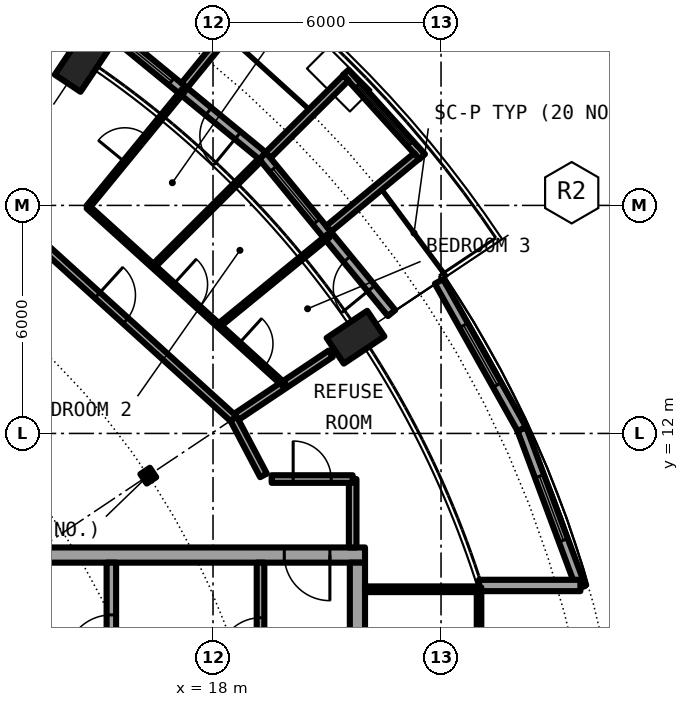
"""IFC4 building model, lengths in metres.
Left out: names, types, materials, properties, quantities, classifications, styles, units other than length and angle.
Written with IfcOpenShell. Run it as: python <this file> out.ifc"""

import sys

from ifc_helpers import new_model, si_unit, direction, frame, frame_2d, origin, origin_2d, place, context, subcontext, project, spatial, rectangle, circle, hollow_circle, i_section, extrude, element, fill, save


model = new_model("IFC4")
c1 = context("Model", 3, precision=1e-05, world=origin(), true_north=direction((0.0, 1.0)))
c2 = subcontext(c1, "Body", "Model", "MODEL_VIEW")
j1 = project(units=[si_unit("LENGTHUNIT", "METRE"), si_unit("PLANEANGLEUNIT", "RADIAN")], contexts=[c1])
p1 = place(None, origin())
s1 = spatial("IfcSite", under=j1, at=p1, CompositionType="ELEMENT")
p2 = place(p1, origin())
s2 = spatial("IfcBuilding", under=s1, at=p2, CompositionType="ELEMENT")
p3 = place(p2, frame((0.0, 0.0, 234.05)))
s3 = spatial("IfcBuildingStorey", under=s2, at=p3, CompositionType="ELEMENT", Elevation=234.05)
for number, where, z_axis, x_axis in (
    (1, (22.283, 14.889, 0.0), (-0.347, -0.232, 0.909), (0.556, -0.831, 0.0)),
    (2, (14.889, 22.283, 0.0), (-0.232, -0.347, 0.909), (0.831, -0.556, 0.0)),
):
    element("IfcColumn", number, at=place(p3, frame(where, z_axis=z_axis, x_axis=x_axis)), inside=s3, PredefinedType="COLUMN", context=c2, shape_type="SweptSolid", body=[
        extrude(hollow_circle(Radius=0.406, WallThickness=0.03, at=origin_2d()), origin(), (0.0, 0.0, 1.0), 3.081),
    ])
p4 = place(p3, frame((16.297, 10.889, 0.0), z_axis=(0.0, 0.0, 1.0), x_axis=(0.831469612303, 0.55557023302, 0.0)))
e3 = element("IfcColumn", 3, at=p4, inside=s3, PredefinedType="COLUMN", context=c2, shape_type="SweptSolid", body=[
    extrude(i_section(OverallWidth=0.3, OverallDepth=0.3, WebThickness=0.011, FlangeThickness=0.019, FilletRadius=0.027, at=origin_2d()), origin(), (0.0, 0.0, 1.0), 3.05),
])
p5 = place(p3, frame((22.699, 15.167, 0.0), z_axis=(0.0, 0.0, 1.0), x_axis=(-0.634382322723, 0.773019449054, 0.0)))
e4 = element("IfcWall", 4, at=p5, inside=s3, PredefinedType="SOLIDWALL", context=c2, shape_type="SweptSolid", body=[
    extrude(rectangle(XDim=5.352, YDim=0.25, at=frame_2d((2.676, 0.0))), origin(), (0.0, 0.0, 1.0), 2.7),
])
p6 = place(p5, frame((0.841, 0.0, 0.0)))
e5 = element("IfcOpeningElement", 5, at=p6, cuts=e4, PredefinedType="OPENING", context=c2, shape_type="SweptSolid", body=[
    extrude(rectangle(XDim=1.0, YDim=2.2, at=frame_2d((0.5, 1.1))), frame((0.0, 0.135, 0.0), z_axis=(0.0, -1.0, 0.0), x_axis=(1.0, 0.0, 0.0)), (0.0, 0.0, 1.0), 0.27),
])
p7 = place(p5, frame((3.111, 0.0, 0.3)))
e6 = element("IfcOpeningElement", 6, at=p7, cuts=e4, PredefinedType="OPENING", context=c2, shape_type="SweptSolid", body=[
    extrude(rectangle(XDim=1.8, YDim=2.1, at=frame_2d((0.9, 1.05))), frame((0.0, 0.135, 0.0), z_axis=(0.0, -1.0, 0.0), x_axis=(1.0, 0.0, 0.0)), (0.0, 0.0, 1.0), 0.27),
])
p8 = place(p3, frame((23.503, 19.282, -0.03), z_axis=(0.0, 0.0, 1.0), x_axis=(-0.671506829416, 0.740998365753, 0.0)))
e7 = element("IfcWall", 7, at=p8, inside=s3, PredefinedType="SOLIDWALL", context=c2, shape_type="SweptSolid", body=[
    extrude(rectangle(XDim=2.993, YDim=0.2, at=frame_2d((1.497, 0.0))), origin(), (0.0, 0.0, 1.0), 2.73),
])
p9 = place(p8, frame((0.457, 0.0, 0.33)))
e8 = element("IfcOpeningElement", 8, at=p9, cuts=e7, PredefinedType="OPENING", context=c2, shape_type="SweptSolid", body=[
    extrude(circle(Radius=1.04, at=frame_2d((1.04, 1.04))), frame((0.0, 0.11, 0.0), z_axis=(0.0, -1.0, 0.0), x_axis=(1.0, 0.0, 0.0)), (0.0, 0.0, 1.0), 0.22),
])
p10 = place(p3, frame((21.041, 17.384, -0.03), z_axis=(0.0, 0.0, 1.0), x_axis=(0.770784861449, 0.63709551667, 0.0)))
e9 = element("IfcWall", 9, at=p10, inside=s3, PredefinedType="SOLIDWALL", context=c2, shape_type="SweptSolid", body=[
    extrude(rectangle(XDim=3.006, YDim=0.2, at=frame_2d((1.503, 0.0))), origin(), (0.0, 0.0, 1.0), 2.73),
])
p11 = place(p3, frame((19.45, 19.323, -0.03), z_axis=(0.0, 0.0, 1.0), x_axis=(0.709727076896, 0.704476739375, 0.0)))
e10 = element("IfcWall", 10, at=p11, inside=s3, PredefinedType="SOLIDWALL", context=c2, shape_type="SweptSolid", body=[
    extrude(rectangle(XDim=2.883, YDim=0.2, at=frame_2d((1.441, 0.0))), origin(), (0.0, 0.0, 1.0), 2.73),
])
p12 = place(p3, frame((19.304, 19.304, 0.0), z_axis=(0.0, 0.0, 1.0), x_axis=(-0.773019449054, 0.634382322723, 0.0)))
e11 = element("IfcWall", 11, at=p12, inside=s3, PredefinedType="SOLIDWALL", context=c2, shape_type="SweptSolid", body=[
    extrude(rectangle(XDim=5.352, YDim=0.25, at=frame_2d((2.676, 0.0))), origin(), (0.0, 0.0, 1.0), 2.7),
])
p13 = place(p12, frame((0.841, 0.0, 0.0)))
e12 = element("IfcOpeningElement", 12, at=p13, cuts=e11, PredefinedType="OPENING", context=c2, shape_type="SweptSolid", body=[
    extrude(rectangle(XDim=1.0, YDim=2.2, at=frame_2d((0.5, 1.1))), frame((0.0, 0.135, 0.0), z_axis=(0.0, -1.0, 0.0), x_axis=(1.0, 0.0, 0.0)), (0.0, 0.0, 1.0), 0.27),
])
p14 = place(p12, frame((3.096, 0.0, 0.3)))
e13 = element("IfcOpeningElement", 13, at=p14, cuts=e11, PredefinedType="OPENING", context=c2, shape_type="SweptSolid", body=[
    extrude(rectangle(XDim=1.8, YDim=2.1, at=frame_2d((0.9, 1.05))), frame((0.0, 0.135, 0.0), z_axis=(0.0, -1.0, 0.0), x_axis=(1.0, 0.0, 0.0)), (0.0, 0.0, 1.0), 0.27),
])
p15 = place(p3, frame((17.246, 21.155, -0.03), z_axis=(0.0, 0.0, 1.0), x_axis=(0.631546363729, 0.775338113639, 0.0)))
e14 = element("IfcWall", 14, at=p15, inside=s3, PredefinedType="SOLIDWALL", context=c2, shape_type="SweptSolid", body=[
    extrude(rectangle(XDim=3.005, YDim=0.2, at=frame_2d((1.502, 0.0))), origin(), (0.0, 0.0, 1.0), 2.73),
])
p16 = place(p3, frame((27.682, 7.945, 0.0), z_axis=(0.0, 0.0, 1.0), x_axis=(-0.349247811493, 0.937030397675, 0.0)))
e15 = element("IfcWall", 15, at=p16, inside=s3, PredefinedType="SOLIDWALL", context=c2, shape_type="SweptSolid", body=[
    extrude(rectangle(XDim=4.452, YDim=0.25, at=frame_2d((2.226, 0.0))), origin(), (0.0, 0.0, 1.0), 2.7),
])
p17 = place(p16, frame((1.327, 0.0, 0.3)))
e16 = element("IfcOpeningElement", 16, at=p17, cuts=e15, PredefinedType="OPENING", context=c2, shape_type="SweptSolid", body=[
    extrude(rectangle(XDim=1.8, YDim=2.1, at=frame_2d((0.9, 1.05))), frame((0.0, 0.135, 0.0), z_axis=(0.0, -1.0, 0.0), x_axis=(1.0, 0.0, 0.0)), (0.0, 0.0, 1.0), 0.27),
])
p18 = place(p3, frame((26.127, 12.117, 0.0), z_axis=(0.0, 0.0, 1.0), x_axis=(-0.489696356642, 0.871893042919, 0.0)))
e17 = element("IfcWall", 17, at=p18, inside=s3, PredefinedType="SOLIDWALL", context=c2, shape_type="SweptSolid", body=[
    extrude(rectangle(XDim=4.454, YDim=0.25, at=frame_2d((2.227, 0.0))), origin(), (0.0, 0.0, 1.0), 2.7),
])
p19 = place(p18, frame((1.327, 0.0, 0.3)))
e18 = element("IfcOpeningElement", 18, at=p19, cuts=e17, PredefinedType="OPENING", context=c2, shape_type="SweptSolid", body=[
    extrude(rectangle(XDim=1.8, YDim=2.1, at=frame_2d((0.9, 1.05))), frame((0.0, 0.135, 0.0), z_axis=(0.0, -1.0, 0.0), x_axis=(1.0, 0.0, 0.0)), (0.0, 0.0, 1.0), 0.27),
])
p20 = place(p3, frame((25.0, 8.0, 0.0), z_axis=(0.0, 0.0, 1.0), x_axis=(1.0, 0.0, 0.0)))
e19 = element("IfcWall", 19, at=p20, inside=s3, PredefinedType="SOLIDWALL", context=c2, shape_type="SweptSolid", body=[
    extrude(rectangle(XDim=2.667, YDim=0.3, at=frame_2d((1.333, 0.0))), origin(), (0.0, 0.0, 1.0), 2.7),
])
p21 = place(p3, frame((22.0, 8.8, 0.0), z_axis=(0.0, 0.0, 1.0), x_axis=(-1.0, 0.0, 0.0)))
e20 = element("IfcWall", 20, at=p21, inside=s3, PredefinedType="SHEAR", context=c2, shape_type="SweptSolid", body=[
    extrude(rectangle(XDim=13.4, YDim=0.4, at=frame_2d((6.7, 0.0))), origin(), (0.0, 0.0, 1.0), 3.05),
])
p22 = place(p21, frame((0.925, 0.0, 0.0)))
e21 = element("IfcOpeningElement", 21, at=p22, cuts=e20, PredefinedType="OPENING", context=c2, shape_type="SweptSolid", body=[
    extrude(rectangle(XDim=1.2, YDim=2.3, at=frame_2d((0.6, 1.15))), frame((0.0, 0.21, 0.0), z_axis=(0.0, -1.0, 0.0), x_axis=(1.0, 0.0, 0.0)), (0.0, 0.0, 1.0), 0.42),
])
p23 = place(p3, frame((21.8, 8.6, 0.0), z_axis=(0.0, 0.0, 1.0), x_axis=(0.0, -1.0, 0.0)))
e22 = element("IfcWall", 22, at=p23, inside=s3, PredefinedType="SHEAR", context=c2, shape_type="SweptSolid", body=[
    extrude(rectangle(XDim=17.2, YDim=0.4, at=frame_2d((8.6, 0.0))), origin(), (0.0, 0.0, 1.0), 3.05),
])
p24 = place(p23, frame((7.7, 0.0, 0.0)))
e23 = element("IfcOpeningElement", 23, at=p24, cuts=e22, PredefinedType="OPENING", context=c2, shape_type="SweptSolid", body=[
    extrude(rectangle(XDim=1.8, YDim=2.3, at=frame_2d((0.9, 1.15))), frame((0.0, 0.21, 0.0), z_axis=(0.0, -1.0, 0.0), x_axis=(1.0, 0.0, 0.0)), (0.0, 0.0, 1.0), 0.42),
])
p25 = place(p3, frame((15.325, 4.65, 0.0), z_axis=(0.0, 0.0, 1.0), x_axis=(0.0, 1.0, 0.0)))
e24 = element("IfcWall", 24, at=p25, inside=s3, PredefinedType="SHEAR", context=c2, shape_type="SweptSolid", body=[
    extrude(rectangle(XDim=3.95, YDim=0.25, at=frame_2d((1.975, 0.0))), origin(), (0.0, 0.0, 1.0), 3.05),
])
p26 = place(p25, frame((1.375, 0.0, 0.0)))
e25 = element("IfcOpeningElement", 25, at=p26, cuts=e24, PredefinedType="OPENING", context=c2, shape_type="SweptSolid", body=[
    extrude(rectangle(XDim=1.2, YDim=2.3, at=frame_2d((0.6, 1.15))), frame((0.0, 0.135, 0.0), z_axis=(0.0, -1.0, 0.0), x_axis=(1.0, 0.0, 0.0)), (0.0, 0.0, 1.0), 0.27),
])
p27 = place(p3, frame((19.25, 1.575, 0.0), z_axis=(0.0, 0.0, 1.0), x_axis=(0.0, 1.0, 0.0)))
e26 = element("IfcWall", 26, at=p27, inside=s3, PredefinedType="SOLIDWALL", context=c2, shape_type="SweptSolid", body=[
    extrude(rectangle(XDim=7.025, YDim=0.2, at=frame_2d((3.513, 0.0))), origin(), (0.0, 0.0, 1.0), 2.7),
])
p28 = place(p27, frame((4.475, 0.0, 0.0)))
e27 = element("IfcOpeningElement", 27, at=p28, cuts=e26, PredefinedType="OPENING", context=c2, shape_type="SweptSolid", body=[
    extrude(rectangle(XDim=1.1, YDim=2.3, at=frame_2d((0.55, 1.15))), frame((0.0, 0.11, 0.0), z_axis=(0.0, -1.0, 0.0), x_axis=(1.0, 0.0, 0.0)), (0.0, 0.0, 1.0), 0.22),
])
p29 = place(p3, frame((22.0, 7.9, 0.0), z_axis=(0.0, 0.0, 1.0), x_axis=(1.0, 0.0, 0.0)))
e28 = element("IfcWall", 28, at=p29, inside=s3, PredefinedType="PARTITIONING", context=c2, shape_type="SweptSolid", body=[
    extrude(rectangle(XDim=2.94, YDim=0.15, at=frame_2d((1.47, 0.0))), origin(), (0.0, 0.0, 1.0), 2.7),
])
p30 = place(p3, frame((25.0, -7.95, 0.0), z_axis=(0.0, 0.0, 1.0), x_axis=(0.0, 1.0, 0.0)))
e29 = element("IfcWall", 29, at=p30, inside=s3, PredefinedType="PARTITIONING", context=c2, shape_type="SweptSolid", body=[
    extrude(rectangle(XDim=15.9, YDim=0.12, at=frame_2d((7.95, 0.0))), origin(), (0.0, 0.0, 1.0), 2.7),
])
p31 = place(p30, frame((0.95, 0.0, 0.1)))
e30 = element("IfcOpeningElement", 30, at=p31, cuts=e29, PredefinedType="OPENING", context=c2, shape_type="SweptSolid", body=[
    extrude(rectangle(XDim=14.0, YDim=2.35, at=frame_2d((7.0, 1.175))), frame((0.0, 0.07, 0.0), z_axis=(0.0, -1.0, 0.0), x_axis=(1.0, 0.0, 0.0)), (0.0, 0.0, 1.0), 0.14),
])
p32 = place(p3, frame((21.675, 9.0, 0.0), z_axis=(0.0, 0.0, 1.0), x_axis=(0.0, 1.0, 0.0)))
e31 = element("IfcWall", 31, at=p32, inside=s3, PredefinedType="PARTITIONING", context=c2, shape_type="SweptSolid", body=[
    extrude(rectangle(XDim=1.8, YDim=0.2, at=frame_2d((0.9, 0.0))), origin(), (0.0, 0.0, 1.0), 2.7),
])
p33 = place(p3, frame((14.709, 17.958, 0.0), z_axis=(0.0, 0.0, 1.0), x_axis=(0.633590098448, 0.773668913133, 0.0)))
e32 = element("IfcWall", 32, at=p33, inside=s3, PredefinedType="PARTITIONING", context=c2, shape_type="SweptSolid", body=[
    extrude(rectangle(XDim=3.962, YDim=0.1, at=frame_2d((1.981, 0.0))), origin(), (0.0, 0.0, 1.0), 2.7),
])
p34 = place(p33, frame((1.531, 0.0, 0.0)))
e33 = element("IfcOpeningElement", 33, at=p34, cuts=e32, PredefinedType="OPENING", context=c2, shape_type="SweptSolid", body=[
    extrude(rectangle(XDim=0.9, YDim=2.3, at=frame_2d((0.45, 1.15))), frame((0.0, 0.06, 0.0), z_axis=(0.0, -1.0, 0.0), x_axis=(1.0, 0.0, 0.0)), (0.0, 0.0, 1.0), 0.12),
])
p35 = place(p3, frame((16.43, 16.398, 0.0), z_axis=(0.0, 0.0, 1.0), x_axis=(0.707722727509, 0.706490297858, 0.0)))
e34 = element("IfcWall", 34, at=p35, inside=s3, PredefinedType="PARTITIONING", context=c2, shape_type="SweptSolid", body=[
    extrude(rectangle(XDim=3.962, YDim=0.1, at=frame_2d((1.981, 0.0))), origin(), (0.0, 0.0, 1.0), 2.7),
])
p36 = place(p3, frame((18.151, 14.838, 0.0), z_axis=(0.0, 0.0, 1.0), x_axis=(0.774321581607, 0.63279229472, 0.0)))
e35 = element("IfcWall", 35, at=p36, inside=s3, PredefinedType="PARTITIONING", context=c2, shape_type="SweptSolid", body=[
    extrude(rectangle(XDim=3.731, YDim=0.1, at=frame_2d((1.866, 0.0))), origin(), (0.0, 0.0, 1.0), 2.7),
])
p37 = place(p3, frame((18.542, 12.389, 0.0), z_axis=(0.0, 0.0, 1.0), x_axis=(0.831340764735, 0.555763018642, 0.0)))
e36 = element("IfcWall", 36, at=p37, inside=s3, PredefinedType="PARTITIONING", context=c2, shape_type="SweptSolid", body=[
    extrude(rectangle(XDim=3.073, YDim=0.2, at=frame_2d((1.537, 0.0))), origin(), (0.0, 0.0, 1.0), 2.7),
])
p38 = place(p3, frame((19.543, 10.8, 0.0), z_axis=(0.0, 0.0, 1.0), x_axis=(1.0, 0.0, 0.0)))
e37 = element("IfcWall", 37, at=p38, inside=s3, PredefinedType="PARTITIONING", context=c2, shape_type="SweptSolid", body=[
    extrude(rectangle(XDim=2.132, YDim=0.2, at=frame_2d((1.066, 0.0))), origin(), (0.0, 0.0, 1.0), 2.7),
])
p39 = place(p38, frame((0.566, 0.0, 0.0)))
e38 = element("IfcOpeningElement", 38, at=p39, cuts=e37, PredefinedType="OPENING", context=c2, shape_type="SweptSolid", body=[
    extrude(rectangle(XDim=1.0, YDim=2.3, at=frame_2d((0.5, 1.15))), frame((0.0, 0.11, 0.0), z_axis=(0.0, -1.0, 0.0), x_axis=(1.0, 0.0, 0.0)), (0.0, 0.0, 1.0), 0.22),
])
p40 = place(p3, frame((10.512, 19.667, 0.0), z_axis=(0.0, 0.0, 1.0), x_axis=(0.740849323054, -0.67167125927, 0.0)))
e39 = element("IfcWall", 39, at=p40, inside=s3, PredefinedType="PARTITIONING", context=c2, shape_type="SweptSolid", body=[
    extrude(rectangle(XDim=10.842, YDim=0.2, at=frame_2d((5.421, 0.0))), origin(), (0.0, 0.0, 1.0), 2.7),
])
p41 = place(p40, frame((6.003, 0.0, 0.0)))
e40 = element("IfcOpeningElement", 40, at=p41, cuts=e39, PredefinedType="OPENING", context=c2, shape_type="SweptSolid", body=[
    extrude(rectangle(XDim=1.0, YDim=2.3, at=frame_2d((0.5, 1.15))), frame((0.0, 0.11, 0.0), z_axis=(0.0, -1.0, 0.0), x_axis=(1.0, 0.0, 0.0)), (0.0, 0.0, 1.0), 0.22),
])
p42 = place(p3, frame((18.542, 12.389, 0.0), z_axis=(0.0, 0.0, 1.0), x_axis=(0.465812036273, -0.88488369115, 0.0)))
e41 = element("IfcWall", 41, at=p42, inside=s3, PredefinedType="PARTITIONING", context=c2, shape_type="SweptSolid", body=[
    extrude(rectangle(XDim=1.687, YDim=0.2, at=frame_2d((0.844, 0.0))), origin(), (0.0, 0.0, 1.0), 2.7),
])
p43 = place(p3, frame((14.709, 17.958, 0.0), z_axis=(0.0, 0.0, 1.0), x_axis=(0.740923753351, -0.671589153962, 0.0)))
e42 = element("IfcWall", 42, at=p43, inside=s3, PredefinedType="PARTITIONING", context=c2, shape_type="SweptSolid", body=[
    extrude(rectangle(XDim=6.969, YDim=0.1, at=frame_2d((3.484, 0.0))), origin(), (0.0, 0.0, 1.0), 2.7),
])
p44 = place(p43, frame((3.034, 0.0, 0.0)))
e43 = element("IfcOpeningElement", 43, at=p44, cuts=e42, PredefinedType="OPENING", context=c2, shape_type="SweptSolid", body=[
    extrude(rectangle(XDim=0.9, YDim=2.3, at=frame_2d((0.45, 1.15))), frame((0.0, 0.06, 0.0), z_axis=(0.0, -1.0, 0.0), x_axis=(1.0, 0.0, 0.0)), (0.0, 0.0, 1.0), 0.12),
])
p45 = place(p43, frame((5.357, 0.0, 0.0)))
e44 = element("IfcOpeningElement", 44, at=p45, cuts=e42, PredefinedType="OPENING", context=c2, shape_type="SweptSolid", body=[
    extrude(rectangle(XDim=0.9, YDim=2.3, at=frame_2d((0.45, 1.15))), frame((0.0, 0.06, 0.0), z_axis=(0.0, -1.0, 0.0), x_axis=(1.0, 0.0, 0.0)), (0.0, 0.0, 1.0), 0.12),
])
p46 = place(p6, origin())
e45 = element("IfcDoor", 45, at=p46, inside=s3, OperationType="SINGLE_SWING_LEFT", PredefinedType="DOOR", context=c2, shape_type="SweptSolid", body=[
    extrude(rectangle(XDim=1.0, YDim=2.2, at=frame_2d((0.5, 1.1))), frame((0.0, 0.025, 0.0), z_axis=(0.0, -1.0, 0.0), x_axis=(1.0, 0.0, 0.0)), (0.0, 0.0, 1.0), 0.05),
])
fill(e5, e45)
p47 = place(p7, origin())
e46 = element("IfcWindow", 46, at=p47, inside=s3, PartitioningType="SINGLE_PANEL", PredefinedType="WINDOW", context=c2, shape_type="SweptSolid", body=[
    extrude(rectangle(XDim=1.8, YDim=2.1, at=frame_2d((0.9, 1.05))), frame((0.0, 0.03, 0.0), z_axis=(0.0, -1.0, 0.0), x_axis=(1.0, 0.0, 0.0)), (0.0, 0.0, 1.0), 0.06),
])
fill(e6, e46)
p48 = place(p9, origin())
e47 = element("IfcWindow", 47, at=p48, inside=s3, PartitioningType="SINGLE_PANEL", PredefinedType="WINDOW", context=c2, shape_type="SweptSolid", body=[
    extrude(circle(Radius=1.04, at=frame_2d((1.04, 1.04))), frame((0.0, 0.03, 0.0), z_axis=(0.0, -1.0, 0.0), x_axis=(1.0, 0.0, 0.0)), (0.0, 0.0, 1.0), 0.06),
])
fill(e8, e47)
p49 = place(p13, origin())
e48 = element("IfcDoor", 48, at=p49, inside=s3, OperationType="SINGLE_SWING_LEFT", PredefinedType="DOOR", context=c2, shape_type="SweptSolid", body=[
    extrude(rectangle(XDim=1.0, YDim=2.2, at=frame_2d((0.5, 1.1))), frame((0.0, 0.025, 0.0), z_axis=(0.0, -1.0, 0.0), x_axis=(1.0, 0.0, 0.0)), (0.0, 0.0, 1.0), 0.05),
])
fill(e12, e48)
p50 = place(p14, origin())
e49 = element("IfcWindow", 49, at=p50, inside=s3, PartitioningType="SINGLE_PANEL", PredefinedType="WINDOW", context=c2, shape_type="SweptSolid", body=[
    extrude(rectangle(XDim=1.8, YDim=2.1, at=frame_2d((0.9, 1.05))), frame((0.0, 0.03, 0.0), z_axis=(0.0, -1.0, 0.0), x_axis=(1.0, 0.0, 0.0)), (0.0, 0.0, 1.0), 0.06),
])
fill(e13, e49)
p51 = place(p17, origin())
e50 = element("IfcWindow", 50, at=p51, inside=s3, PartitioningType="SINGLE_PANEL", PredefinedType="WINDOW", context=c2, shape_type="SweptSolid", body=[
    extrude(rectangle(XDim=1.8, YDim=2.1, at=frame_2d((0.9, 1.05))), frame((0.0, 0.03, 0.0), z_axis=(0.0, -1.0, 0.0), x_axis=(1.0, 0.0, 0.0)), (0.0, 0.0, 1.0), 0.06),
])
fill(e16, e50)
p52 = place(p19, origin())
e51 = element("IfcWindow", 51, at=p52, inside=s3, PartitioningType="SINGLE_PANEL", PredefinedType="WINDOW", context=c2, shape_type="SweptSolid", body=[
    extrude(rectangle(XDim=1.8, YDim=2.1, at=frame_2d((0.9, 1.05))), frame((0.0, 0.03, 0.0), z_axis=(0.0, -1.0, 0.0), x_axis=(1.0, 0.0, 0.0)), (0.0, 0.0, 1.0), 0.06),
])
fill(e18, e51)
p53 = place(p26, origin())
e52 = element("IfcDoor", 52, at=p53, inside=s3, OperationType="SINGLE_SWING_LEFT", PredefinedType="DOOR", context=c2, shape_type="SweptSolid", body=[
    extrude(rectangle(XDim=1.2, YDim=2.3, at=frame_2d((0.6, 1.15))), frame((0.0, 0.025, 0.0), z_axis=(0.0, -1.0, 0.0), x_axis=(1.0, 0.0, 0.0)), (0.0, 0.0, 1.0), 0.05),
])
fill(e25, e52)
p54 = place(p28, origin())
e53 = element("IfcDoor", 53, at=p54, inside=s3, OperationType="SINGLE_SWING_LEFT", PredefinedType="DOOR", context=c2, shape_type="SweptSolid", body=[
    extrude(rectangle(XDim=1.1, YDim=2.3, at=frame_2d((0.55, 1.15))), frame((0.0, 0.025, 0.0), z_axis=(0.0, -1.0, 0.0), x_axis=(1.0, 0.0, 0.0)), (0.0, 0.0, 1.0), 0.05),
])
fill(e27, e53)
p55 = place(p22, origin())
e54 = element("IfcDoor", 54, at=p55, inside=s3, OperationType="SINGLE_SWING_RIGHT", PredefinedType="DOOR", context=c2, shape_type="SweptSolid", body=[
    extrude(rectangle(XDim=1.2, YDim=2.3, at=frame_2d((0.6, 1.15))), frame((0.0, 0.025, 0.0), z_axis=(0.0, -1.0, 0.0), x_axis=(1.0, 0.0, 0.0)), (0.0, 0.0, 1.0), 0.05),
])
fill(e21, e54)
p56 = place(p31, origin())
e55 = element("IfcWindow", 55, at=p56, inside=s3, PartitioningType="SINGLE_PANEL", PredefinedType="WINDOW", context=c2, shape_type="SweptSolid", body=[
    extrude(rectangle(XDim=14.0, YDim=2.35, at=frame_2d((7.0, 1.175))), frame((0.0, 0.03, 0.0), z_axis=(0.0, -1.0, 0.0), x_axis=(1.0, 0.0, 0.0)), (0.0, 0.0, 1.0), 0.06),
])
fill(e30, e55)
p57 = place(p41, origin())
e56 = element("IfcDoor", 56, at=p57, inside=s3, OperationType="SINGLE_SWING_RIGHT", PredefinedType="DOOR", context=c2, shape_type="SweptSolid", body=[
    extrude(rectangle(XDim=1.0, YDim=2.3, at=frame_2d((0.5, 1.15))), frame((0.0, 0.025, 0.0), z_axis=(0.0, -1.0, 0.0), x_axis=(1.0, 0.0, 0.0)), (0.0, 0.0, 1.0), 0.05),
])
fill(e40, e56)
p58 = place(p34, origin())
e57 = element("IfcDoor", 57, at=p58, inside=s3, OperationType="SINGLE_SWING_RIGHT", PredefinedType="DOOR", context=c2, shape_type="SweptSolid", body=[
    extrude(rectangle(XDim=0.9, YDim=2.3, at=frame_2d((0.45, 1.15))), frame((0.0, 0.025, 0.0), z_axis=(0.0, -1.0, 0.0), x_axis=(1.0, 0.0, 0.0)), (0.0, 0.0, 1.0), 0.05),
])
fill(e33, e57)
p59 = place(p44, origin())
e58 = element("IfcDoor", 58, at=p59, inside=s3, OperationType="SINGLE_SWING_LEFT", PredefinedType="DOOR", context=c2, shape_type="SweptSolid", body=[
    extrude(rectangle(XDim=0.9, YDim=2.3, at=frame_2d((0.45, 1.15))), frame((0.0, 0.025, 0.0), z_axis=(0.0, -1.0, 0.0), x_axis=(1.0, 0.0, 0.0)), (0.0, 0.0, 1.0), 0.05),
])
fill(e43, e58)
p60 = place(p45, origin())
e59 = element("IfcDoor", 59, at=p60, inside=s3, OperationType="SINGLE_SWING_RIGHT", PredefinedType="DOOR", context=c2, shape_type="SweptSolid", body=[
    extrude(rectangle(XDim=0.9, YDim=2.3, at=frame_2d((0.45, 1.15))), frame((0.0, 0.025, 0.0), z_axis=(0.0, -1.0, 0.0), x_axis=(1.0, 0.0, 0.0)), (0.0, 0.0, 1.0), 0.05),
])
fill(e44, e59)
p61 = place(p39, origin())
e60 = element("IfcDoor", 60, at=p61, inside=s3, OperationType="SINGLE_SWING_RIGHT", PredefinedType="DOOR", context=c2, shape_type="SweptSolid", body=[
    extrude(rectangle(XDim=1.0, YDim=2.3, at=frame_2d((0.5, 1.15))), frame((0.0, 0.025, 0.0), z_axis=(0.0, -1.0, 0.0), x_axis=(1.0, 0.0, 0.0)), (0.0, 0.0, 1.0), 0.05),
])
fill(e38, e60)
save(model, sys.argv[1])
